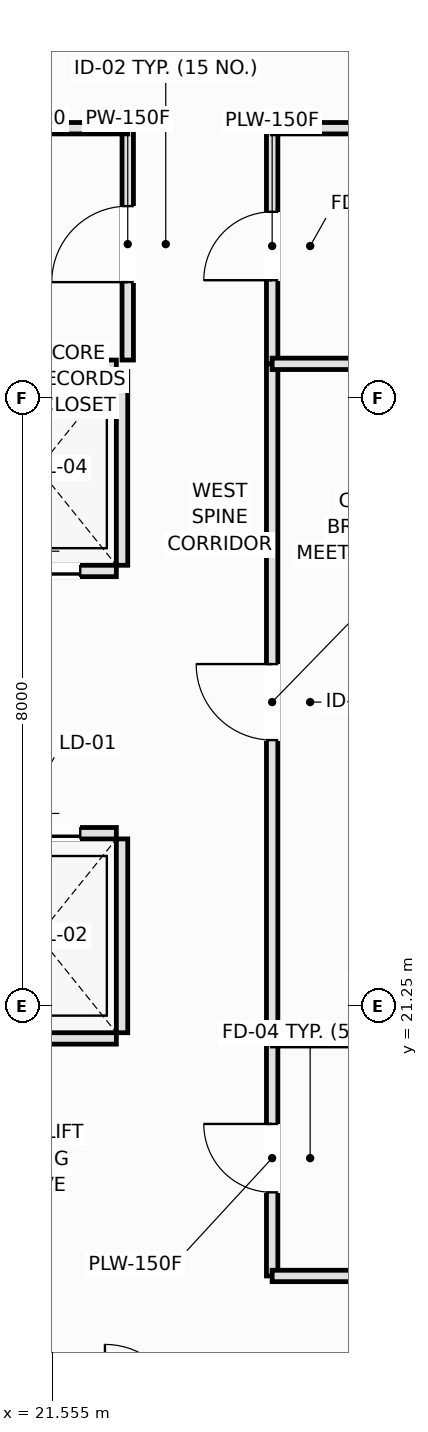
"""IFC4 building model, lengths in metres.
Left out: names, types, materials, properties, quantities, classifications, styles, units other than length and angle.
Written with IfcOpenShell. Run it as: python <this file> out.ifc"""

import sys

from ifc_helpers import new_model, si_unit, direction, frame, frame_2d, origin, place, context, subcontext, project, spatial, rectangle, extrude, element, fill, save


model = new_model("IFC4")
c1 = context("Model", 3, precision=1e-05, world=origin(), true_north=direction((0.0, 1.0)))
c2 = subcontext(c1, "Body", "Model", "MODEL_VIEW")
j1 = project(units=[si_unit("LENGTHUNIT", "METRE"), si_unit("PLANEANGLEUNIT", "RADIAN")], contexts=[c1])
p1 = place(None, origin())
s1 = spatial("IfcSite", under=j1, at=p1, CompositionType="ELEMENT")
p2 = place(p1, origin())
s2 = spatial("IfcBuilding", under=s1, at=p2, CompositionType="ELEMENT")
p3 = place(p2, frame((0.0, 0.0, 75.3)))
s3 = spatial("IfcBuildingStorey", under=s2, at=p3, CompositionType="ELEMENT", Elevation=75.3)
p4 = place(p3, frame((20.35, 20.825, 0.0), z_axis=(0.0, 0.0, 1.0), x_axis=(1.0, 0.0, 0.0)))
e1 = element("IfcWall", 1, at=p4, inside=s3, PredefinedType="PARTITIONING", context=c2, shape_type="SweptSolid", body=[
    extrude(rectangle(XDim=2.05, YDim=0.15, at=frame_2d((1.025, 0.0))), origin(), (0.0, 0.0, 1.0), 3.37),
])
p5 = place(p3, frame((20.35, 23.525, 0.0), z_axis=(0.0, 0.0, 1.0), x_axis=(1.0, 0.0, 0.0)))
e2 = element("IfcWall", 2, at=p5, inside=s3, PredefinedType="PARTITIONING", context=c2, shape_type="SweptSolid", body=[
    extrude(rectangle(XDim=2.05, YDim=0.15, at=frame_2d((1.025, 0.0))), origin(), (0.0, 0.0, 1.0), 3.37),
])
p6 = place(p5, frame((0.475, 0.0, 0.0)))
e3 = element("IfcOpeningElement", 3, at=p6, cuts=e2, PredefinedType="OPENING", context=c2, shape_type="SweptSolid", body=[
    extrude(rectangle(XDim=1.1, YDim=2.2, at=frame_2d((0.55, 1.1))), frame((0.0, 0.085, 0.0), z_axis=(0.0, -1.0, 0.0), x_axis=(1.0, 0.0, 0.0)), (0.0, 0.0, 1.0), 0.17),
])
p7 = place(p3, frame((22.475, 20.9, 0.0), z_axis=(0.0, 0.0, 1.0), x_axis=(0.0, 1.0, 0.0)))
e4 = element("IfcWall", 4, at=p7, inside=s3, PredefinedType="PARTITIONING", context=c2, shape_type="SweptSolid", body=[
    extrude(rectangle(XDim=2.55, YDim=0.15, at=frame_2d((1.275, 0.0))), origin(), (0.0, 0.0, 1.0), 3.37),
])
p8 = place(p3, frame((20.35, 26.975, 0.0), z_axis=(0.0, 0.0, 1.0), x_axis=(1.0, 0.0, 0.0)))
e5 = element("IfcWall", 5, at=p8, inside=s3, PredefinedType="PARTITIONING", context=c2, shape_type="SweptSolid", body=[
    extrude(rectangle(XDim=2.05, YDim=0.15, at=frame_2d((1.025, 0.0))), origin(), (0.0, 0.0, 1.0), 3.37),
])
p9 = place(p8, frame((0.475, 0.0, 0.0)))
e6 = element("IfcOpeningElement", 6, at=p9, cuts=e5, PredefinedType="OPENING", context=c2, shape_type="SweptSolid", body=[
    extrude(rectangle(XDim=1.1, YDim=2.2, at=frame_2d((0.55, 1.1))), frame((0.0, 0.085, 0.0), z_axis=(0.0, -1.0, 0.0), x_axis=(1.0, 0.0, 0.0)), (0.0, 0.0, 1.0), 0.17),
])
p10 = place(p3, frame((20.35, 29.675, 0.0), z_axis=(0.0, 0.0, 1.0), x_axis=(1.0, 0.0, 0.0)))
e7 = element("IfcWall", 7, at=p10, inside=s3, PredefinedType="PARTITIONING", context=c2, shape_type="SweptSolid", body=[
    extrude(rectangle(XDim=2.05, YDim=0.15, at=frame_2d((1.025, 0.0))), origin(), (0.0, 0.0, 1.0), 3.37),
])
p11 = place(p3, frame((22.475, 27.05, 0.0), z_axis=(0.0, 0.0, 1.0), x_axis=(0.0, 1.0, 0.0)))
e8 = element("IfcWall", 8, at=p11, inside=s3, PredefinedType="PARTITIONING", context=c2, shape_type="SweptSolid", body=[
    extrude(rectangle(XDim=2.55, YDim=0.15, at=frame_2d((1.275, 0.0))), origin(), (0.0, 0.0, 1.0), 3.37),
])
p12 = place(p3, frame((22.55, 29.75, 0.0), z_axis=(0.0, 0.0, 1.0), x_axis=(0.0, 1.0, 0.0)))
e9 = element("IfcWall", 9, at=p12, inside=s3, PredefinedType="PARTITIONING", context=c2, shape_type="SweptSolid", body=[
    extrude(rectangle(XDim=3.05, YDim=0.15, at=frame_2d((1.525, 0.0))), origin(), (0.0, 0.0, 1.0), 3.01),
])
p13 = place(p12, frame((1.025, 0.0, 0.0)))
e10 = element("IfcOpeningElement", 10, at=p13, cuts=e9, PredefinedType="OPENING", context=c2, shape_type="SweptSolid", body=[
    extrude(rectangle(XDim=1.0, YDim=2.15, at=frame_2d((0.5, 1.075))), frame((0.0, 0.085, 0.0), z_axis=(0.0, -1.0, 0.0), x_axis=(1.0, 0.0, 0.0)), (0.0, 0.0, 1.0), 0.17),
])
p14 = place(p3, frame((24.45, 17.7, 0.0), z_axis=(0.0, 0.0, 1.0), x_axis=(0.0, 1.0, 0.0)))
e11 = element("IfcWall", 11, at=p14, inside=s3, PredefinedType="PLUMBINGWALL", context=c2, shape_type="SweptSolid", body=[
    extrude(rectangle(XDim=3.1, YDim=0.15, at=frame_2d((1.55, 0.0))), origin(), (0.0, 0.0, 1.0), 3.37),
])
p15 = place(p14, frame((1.1, 0.0, 0.0)))
e12 = element("IfcOpeningElement", 12, at=p15, cuts=e11, PredefinedType="OPENING", context=c2, shape_type="SweptSolid", body=[
    extrude(rectangle(XDim=0.9, YDim=2.1, at=frame_2d((0.45, 1.05))), frame((0.0, 0.085, 0.0), z_axis=(0.0, -1.0, 0.0), x_axis=(1.0, 0.0, 0.0)), (0.0, 0.0, 1.0), 0.17),
])
p16 = place(p3, frame((24.45, 29.7, 0.0), z_axis=(0.0, 0.0, 1.0), x_axis=(0.0, 1.0, 0.0)))
e13 = element("IfcWall", 13, at=p16, inside=s3, PredefinedType="PLUMBINGWALL", context=c2, shape_type="SweptSolid", body=[
    extrude(rectangle(XDim=3.1, YDim=0.15, at=frame_2d((1.55, 0.0))), origin(), (0.0, 0.0, 1.0), 3.37),
])
p17 = place(p16, frame((1.1, 0.0, 0.0)))
e14 = element("IfcOpeningElement", 14, at=p17, cuts=e13, PredefinedType="OPENING", context=c2, shape_type="SweptSolid", body=[
    extrude(rectangle(XDim=0.9, YDim=2.1, at=frame_2d((0.45, 1.05))), frame((0.0, 0.085, 0.0), z_axis=(0.0, -1.0, 0.0), x_axis=(1.0, 0.0, 0.0)), (0.0, 0.0, 1.0), 0.17),
])
p18 = place(p3, frame((24.45, 20.8, 0.0), z_axis=(0.0, 0.0, 1.0), x_axis=(0.0, 1.0, 0.0)))
e15 = element("IfcWall", 15, at=p18, inside=s3, PredefinedType="PARTITIONING", context=c2, shape_type="SweptSolid", body=[
    extrude(rectangle(XDim=8.9, YDim=0.15, at=frame_2d((4.45, 0.0))), origin(), (0.0, 0.0, 1.0), 3.37),
])
p19 = place(p18, frame((3.95, 0.0, 0.0)))
e16 = element("IfcOpeningElement", 16, at=p19, cuts=e15, PredefinedType="OPENING", context=c2, shape_type="SweptSolid", body=[
    extrude(rectangle(XDim=1.0, YDim=2.15, at=frame_2d((0.5, 1.075))), frame((0.0, 0.085, 0.0), z_axis=(0.0, -1.0, 0.0), x_axis=(1.0, 0.0, 0.0)), (0.0, 0.0, 1.0), 0.17),
])
p20 = place(p3, frame((24.45, 17.7, 0.0), z_axis=(0.0, 0.0, 1.0), x_axis=(1.0, 0.0, 0.0)))
e17 = element("IfcWall", 17, at=p20, inside=s3, PredefinedType="PLUMBINGWALL", context=c2, shape_type="SweptSolid", body=[
    extrude(rectangle(XDim=3.15, YDim=0.15, at=frame_2d((1.575, 0.0))), origin(), (0.0, 0.0, 1.0), 3.37),
])
p21 = place(p3, frame((21.25, 32.8, 0.0), z_axis=(0.0, 0.0, 1.0), x_axis=(1.0, 0.0, 0.0)))
e18 = element("IfcWall", 18, at=p21, inside=s3, PredefinedType="PARTITIONING", context=c2, shape_type="SweptSolid", body=[
    extrude(rectangle(XDim=1.3, YDim=0.15, at=frame_2d((0.65, 0.0))), origin(), (0.0, 0.0, 1.0), 3.37),
])
p22 = place(p3, frame((24.45, 32.8, 0.0), z_axis=(0.0, 0.0, 1.0), x_axis=(1.0, 0.0, 0.0)))
e19 = element("IfcWall", 19, at=p22, inside=s3, PredefinedType="PLUMBINGWALL", context=c2, shape_type="SweptSolid", body=[
    extrude(rectangle(XDim=3.15, YDim=0.15, at=frame_2d((1.575, 0.0))), origin(), (0.0, 0.0, 1.0), 3.37),
])
for number, where, z_axis, x_axis in (
    (20, (24.45, 20.8, 0.0), (0.0, 0.0, 1.0), (1.0, 0.0, 0.0)),
    (21, (24.45, 29.7, 0.0), (0.0, 0.0, 1.0), (1.0, 0.0, 0.0)),
):
    element("IfcWall", number, at=place(p3, frame(where, z_axis=z_axis, x_axis=x_axis)), inside=s3, PredefinedType="PLUMBINGWALL", context=c2, shape_type="SweptSolid", body=[
        extrude(rectangle(XDim=3.05, YDim=0.15, at=frame_2d((1.525, 0.0))), origin(), (0.0, 0.0, 1.0), 3.37),
    ])
p23 = place(p6, origin())
e22 = element("IfcDoor", 22, at=p23, inside=s3, OperationType="DOUBLE_DOOR_SLIDING", PredefinedType="DOOR", context=c2, shape_type="SweptSolid", body=[
    extrude(rectangle(XDim=1.1, YDim=2.2, at=frame_2d((0.55, 1.1))), frame((0.0, 0.025, 0.0), z_axis=(0.0, -1.0, 0.0), x_axis=(1.0, 0.0, 0.0)), (0.0, 0.0, 1.0), 0.05),
])
fill(e3, e22)
p24 = place(p9, origin())
e23 = element("IfcDoor", 23, at=p24, inside=s3, OperationType="DOUBLE_DOOR_SLIDING", PredefinedType="DOOR", context=c2, shape_type="SweptSolid", body=[
    extrude(rectangle(XDim=1.1, YDim=2.2, at=frame_2d((0.55, 1.1))), frame((0.0, 0.025, 0.0), z_axis=(0.0, -1.0, 0.0), x_axis=(1.0, 0.0, 0.0)), (0.0, 0.0, 1.0), 0.05),
])
fill(e6, e23)
p25 = place(p13, origin())
e24 = element("IfcDoor", 24, at=p25, inside=s3, OperationType="SINGLE_SWING_LEFT", PredefinedType="DOOR", context=c2, shape_type="SweptSolid", body=[
    extrude(rectangle(XDim=1.0, YDim=2.15, at=frame_2d((0.5, 1.075))), frame((0.0, 0.025, 0.0), z_axis=(0.0, -1.0, 0.0), x_axis=(1.0, 0.0, 0.0)), (0.0, 0.0, 1.0), 0.05),
])
fill(e10, e24)
p26 = place(p15, origin())
e25 = element("IfcDoor", 25, at=p26, inside=s3, OperationType="SINGLE_SWING_RIGHT", PredefinedType="DOOR", context=c2, shape_type="SweptSolid", body=[
    extrude(rectangle(XDim=0.9, YDim=2.1, at=frame_2d((0.45, 1.05))), frame((0.0, 0.025, 0.0), z_axis=(0.0, -1.0, 0.0), x_axis=(1.0, 0.0, 0.0)), (0.0, 0.0, 1.0), 0.05),
])
fill(e12, e25)
p27 = place(p17, origin())
e26 = element("IfcDoor", 26, at=p27, inside=s3, OperationType="SINGLE_SWING_LEFT", PredefinedType="DOOR", context=c2, shape_type="SweptSolid", body=[
    extrude(rectangle(XDim=0.9, YDim=2.1, at=frame_2d((0.45, 1.05))), frame((0.0, 0.025, 0.0), z_axis=(0.0, -1.0, 0.0), x_axis=(1.0, 0.0, 0.0)), (0.0, 0.0, 1.0), 0.05),
])
fill(e14, e26)
p28 = place(p19, origin())
e27 = element("IfcDoor", 27, at=p28, inside=s3, OperationType="SINGLE_SWING_RIGHT", PredefinedType="DOOR", context=c2, shape_type="SweptSolid", body=[
    extrude(rectangle(XDim=1.0, YDim=2.15, at=frame_2d((0.5, 1.075))), frame((0.0, 0.025, 0.0), z_axis=(0.0, -1.0, 0.0), x_axis=(1.0, 0.0, 0.0)), (0.0, 0.0, 1.0), 0.05),
])
fill(e16, e27)
save(model, sys.argv[1])
